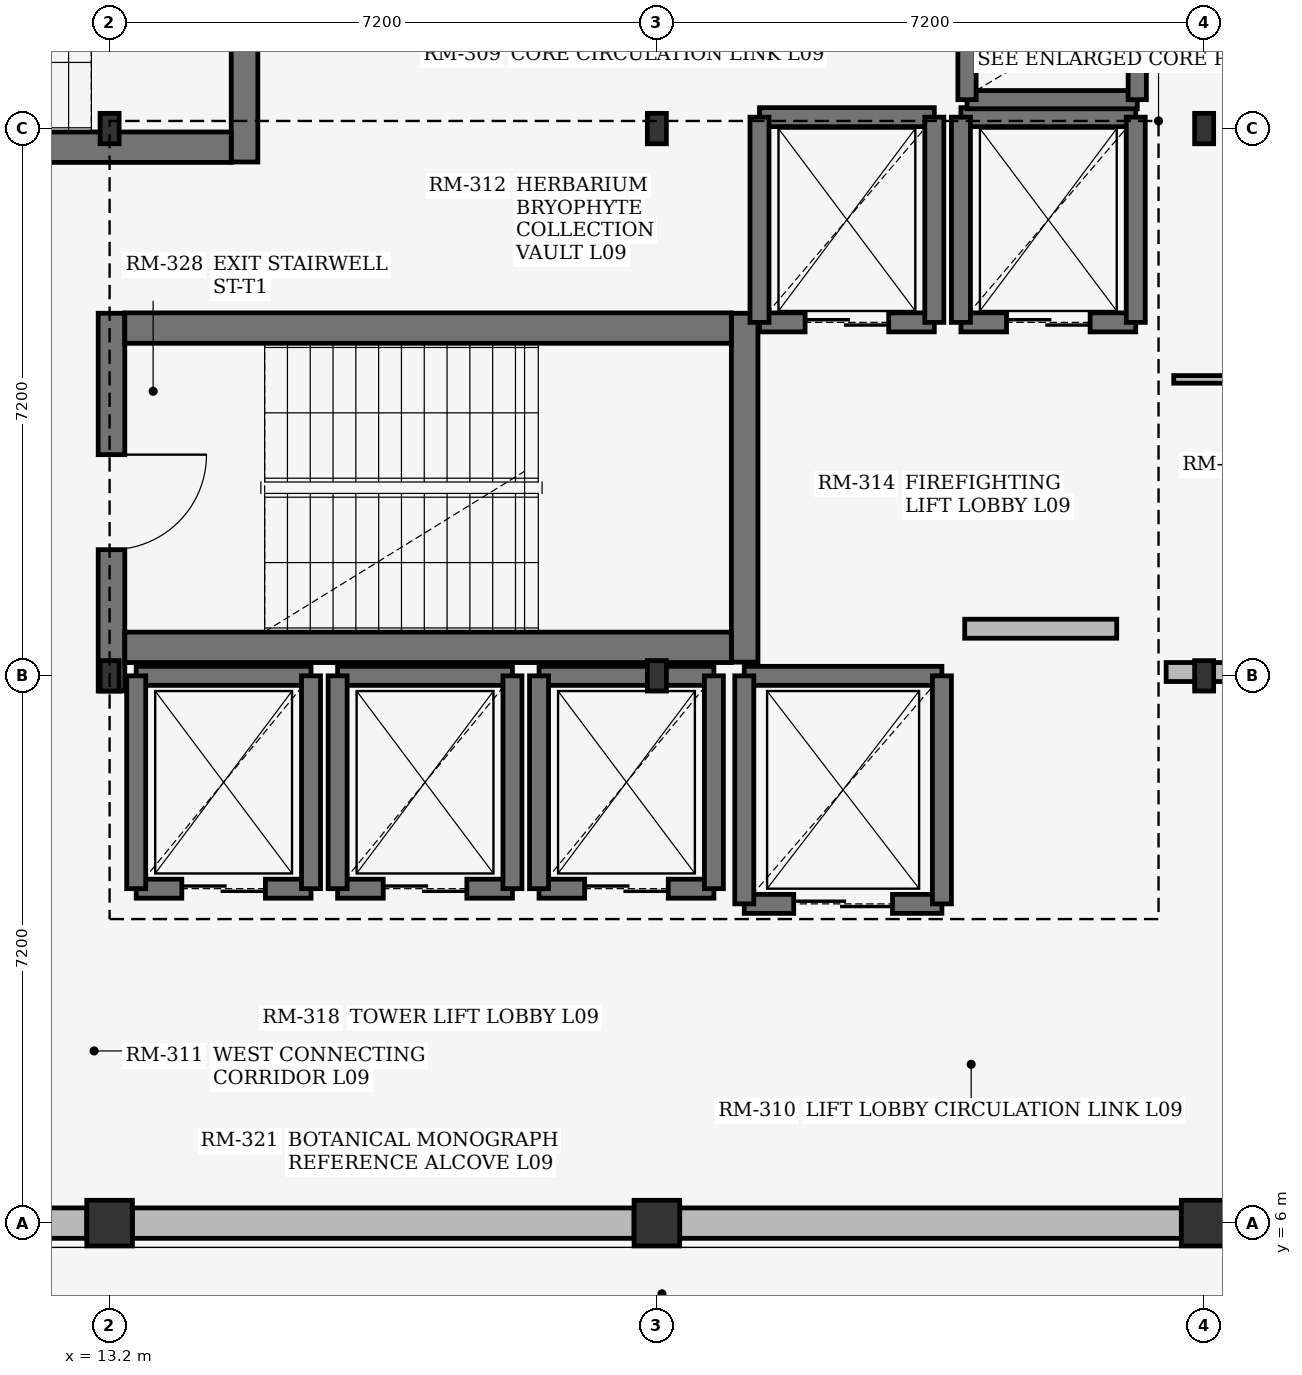
"""IFC4 building model, lengths in metres.
Left out: names, types, materials, properties, quantities, classifications, styles, units other than length and angle.
Written with IfcOpenShell. Run it as: python <this file> out.ifc"""

import sys

from ifc_helpers import new_model, si_unit, direction, frame, frame_2d, origin, origin_2d, place, context, subcontext, project, spatial, rectangle, i_section, extrude, element, fill, save


model = new_model("IFC4")
c1 = context("Model", 3, precision=1e-05, world=origin(), true_north=direction((0.0, 1.0)))
c2 = subcontext(c1, "Body", "Model", "MODEL_VIEW")
j1 = project(units=[si_unit("LENGTHUNIT", "METRE"), si_unit("PLANEANGLEUNIT", "RADIAN")], contexts=[c1])
p1 = place(None, origin())
s1 = spatial("IfcSite", under=j1, at=p1, CompositionType="ELEMENT")
p2 = place(p1, origin())
s2 = spatial("IfcBuilding", under=s1, at=p2, CompositionType="ELEMENT")
p3 = place(p2, frame((0.0, 0.0, 36.6)))
s3 = spatial("IfcBuildingStorey", under=s2, at=p3, CompositionType="ELEMENT", Elevation=36.6)
p4 = place(p3, frame((13.2, 6.0, 0.0), z_axis=(0.0, 0.0, 1.0), x_axis=(1.0, 0.0, 0.0)))
e1 = element("IfcColumn", 1, at=p4, inside=s3, PredefinedType="COLUMN", context=c2, shape_type="SweptSolid", body=[
    extrude(rectangle(XDim=0.6, YDim=0.6, at=origin_2d()), origin(), (0.0, 0.0, 1.0), 3.62),
])
for number, where, z_axis, x_axis in (
    (2, (13.2, 13.2, 0.0), (0.0, 0.0, 1.0), (1.0, 0.0, 0.0)),
    (3, (13.2, 20.4, 0.0), (0.0, 0.0, 1.0), (1.0, 0.0, 0.0)),
):
    element("IfcColumn", number, at=place(p3, frame(where, z_axis=z_axis, x_axis=x_axis)), inside=s3, PredefinedType="COLUMN", context=c2, shape_type="SweptSolid", body=[
        extrude(i_section(OverallWidth=0.25, OverallDepth=0.4, WebThickness=0.01, FlangeThickness=0.013, at=origin_2d()), origin(), (0.0, 0.0, 1.0), 3.62),
    ])
p5 = place(p3, frame((20.4, 6.0, 0.0), z_axis=(0.0, 0.0, 1.0), x_axis=(1.0, 0.0, 0.0)))
e4 = element("IfcColumn", 4, at=p5, inside=s3, PredefinedType="COLUMN", context=c2, shape_type="SweptSolid", body=[
    extrude(rectangle(XDim=0.6, YDim=0.6, at=origin_2d()), origin(), (0.0, 0.0, 1.0), 3.62),
])
for number, where, z_axis, x_axis in (
    (5, (20.4, 13.2, 0.0), (0.0, 0.0, 1.0), (1.0, 0.0, 0.0)),
    (6, (20.4, 20.4, 0.0), (0.0, 0.0, 1.0), (1.0, 0.0, 0.0)),
):
    element("IfcColumn", number, at=place(p3, frame(where, z_axis=z_axis, x_axis=x_axis)), inside=s3, PredefinedType="COLUMN", context=c2, shape_type="SweptSolid", body=[
        extrude(i_section(OverallWidth=0.25, OverallDepth=0.4, WebThickness=0.01, FlangeThickness=0.013, at=origin_2d()), origin(), (0.0, 0.0, 1.0), 3.62),
    ])
p6 = place(p3, frame((27.6, 6.0, 0.0), z_axis=(0.0, 0.0, 1.0), x_axis=(1.0, 0.0, 0.0)))
e7 = element("IfcColumn", 7, at=p6, inside=s3, PredefinedType="COLUMN", context=c2, shape_type="SweptSolid", body=[
    extrude(rectangle(XDim=0.6, YDim=0.6, at=origin_2d()), origin(), (0.0, 0.0, 1.0), 3.62),
])
for number, where, z_axis, x_axis in (
    (8, (27.6, 13.2, 0.0), (0.0, 0.0, 1.0), (1.0, 0.0, 0.0)),
    (9, (27.6, 20.4, 0.0), (0.0, 0.0, 1.0), (1.0, 0.0, 0.0)),
):
    element("IfcColumn", number, at=place(p3, frame(where, z_axis=z_axis, x_axis=x_axis)), inside=s3, PredefinedType="COLUMN", context=c2, shape_type="SweptSolid", body=[
        extrude(i_section(OverallWidth=0.25, OverallDepth=0.4, WebThickness=0.01, FlangeThickness=0.013, at=origin_2d()), origin(), (0.0, 0.0, 1.0), 3.62),
    ])
p7 = place(p3, frame((6.3, 6.0, 0.0), z_axis=(0.0, 0.0, 1.0), x_axis=(1.0, 0.0, 0.0)))
e10 = element("IfcWall", 10, at=p7, inside=s3, PredefinedType="STANDARD", context=c2, shape_type="SweptSolid", body=[
    extrude(rectangle(XDim=6.6, YDim=0.4, at=frame_2d((3.3, 0.0))), origin(), (0.0, 0.0, 1.0), 3.1),
])
for number, where, z_axis, x_axis in (
    (11, (13.5, 6.0, 0.0), (0.0, 0.0, 1.0), (1.0, 0.0, 0.0)),
    (12, (20.7, 6.0, 0.0), (0.0, 0.0, 1.0), (1.0, 0.0, 0.0)),
):
    element("IfcWall", number, at=place(p3, frame(where, z_axis=z_axis, x_axis=x_axis)), inside=s3, PredefinedType="STANDARD", context=c2, shape_type="SweptSolid", body=[
        extrude(rectangle(XDim=6.6, YDim=0.4, at=frame_2d((3.3, 0.0))), origin(), (0.0, 0.0, 1.0), 3.1),
    ])
p8 = place(p3, frame((13.225, 13.0, 0.0), z_axis=(0.0, 0.0, 1.0), x_axis=(0.0, 1.0, 0.0)))
e13 = element("IfcWall", 13, at=p8, inside=s3, PredefinedType="SHEAR", context=c2, shape_type="SweptSolid", body=[
    extrude(rectangle(XDim=4.97, YDim=0.35, at=frame_2d((2.485, 0.0))), origin(), (0.0, 0.0, 1.0), 3.62),
])
p9 = place(p8, frame((1.86, 0.0, 0.0)))
e14 = element("IfcOpeningElement", 14, at=p9, cuts=e13, PredefinedType="OPENING", context=c2, shape_type="SweptSolid", body=[
    extrude(rectangle(XDim=1.25, YDim=2.2, at=frame_2d((0.625, 1.1))), frame((0.0, 0.185, 0.0), z_axis=(0.0, -1.0, 0.0), x_axis=(1.0, 0.0, 0.0)), (0.0, 0.0, 1.0), 0.37),
])
p10 = place(p3, frame((21.555, 13.38, 0.0), z_axis=(0.0, 0.0, 1.0), x_axis=(0.0, 1.0, 0.0)))
e15 = element("IfcWall", 15, at=p10, inside=s3, PredefinedType="SHEAR", context=c2, shape_type="SweptSolid", body=[
    extrude(rectangle(XDim=4.59, YDim=0.35, at=frame_2d((2.295, 0.0))), origin(), (0.0, 0.0, 1.0), 3.62),
])
for number, where, z_axis, x_axis in (
    (16, (13.4, 13.575, 0.0), (0.0, 0.0, 1.0), (1.0, 0.0, 0.0)),
    (17, (13.4, 17.775, 0.0), (0.0, 0.0, 1.0), (1.0, 0.0, 0.0)),
):
    element("IfcWall", number, at=place(p3, frame(where, z_axis=z_axis, x_axis=x_axis)), inside=s3, PredefinedType="SHEAR", context=c2, shape_type="SweptSolid", body=[
        extrude(rectangle(XDim=7.98, YDim=0.4, at=frame_2d((3.99, 0.0))), origin(), (0.0, 0.0, 1.0), 3.62),
    ])
p11 = place(p3, frame((14.975, 24.55, 0.0), z_axis=(0.0, 0.0, 1.0), x_axis=(0.0, -1.0, 0.0)))
e18 = element("IfcWall", 18, at=p11, inside=s3, PredefinedType="SHEAR", context=c2, shape_type="SweptSolid", body=[
    extrude(rectangle(XDim=4.59, YDim=0.35, at=frame_2d((2.295, 0.0))), origin(), (0.0, 0.0, 1.0), 3.62),
])
p12 = place(p11, frame((1.72, 0.0, 0.0)))
e19 = element("IfcOpeningElement", 19, at=p12, cuts=e18, PredefinedType="OPENING", context=c2, shape_type="SweptSolid", body=[
    extrude(rectangle(XDim=1.15, YDim=2.2, at=frame_2d((0.575, 1.1))), frame((0.0, 0.185, 0.0), z_axis=(0.0, -1.0, 0.0), x_axis=(1.0, 0.0, 0.0)), (0.0, 0.0, 1.0), 0.37),
])
p13 = place(p3, frame((14.8, 20.155, 0.0), z_axis=(0.0, 0.0, 1.0), x_axis=(-1.0, 0.0, 0.0)))
e20 = element("IfcWall", 20, at=p13, inside=s3, PredefinedType="SHEAR", context=c2, shape_type="SweptSolid", body=[
    extrude(rectangle(XDim=7.98, YDim=0.4, at=frame_2d((3.99, 0.0))), origin(), (0.0, 0.0, 1.0), 3.62),
])
p14 = place(p3, frame((21.75, 17.85, 0.0), z_axis=(0.0, 0.0, 1.0), x_axis=(1.0, 0.0, 0.0)))
e21 = element("IfcWall", 21, at=p14, inside=s3, PredefinedType="SHEAR", context=c2, shape_type="SweptSolid", body=[
    extrude(rectangle(XDim=2.3, YDim=0.25, at=frame_2d((1.15, 0.0))), origin(), (0.0, 0.0, 1.0), 3.62),
])
p15 = place(p14, frame((0.6, 0.0, 0.0)))
e22 = element("IfcOpeningElement", 22, at=p15, cuts=e21, PredefinedType="OPENING", context=c2, shape_type="SweptSolid", body=[
    extrude(rectangle(XDim=1.1, YDim=2.2, at=frame_2d((0.55, 1.1))), frame((0.0, 0.135, 0.0), z_axis=(0.0, -1.0, 0.0), x_axis=(1.0, 0.0, 0.0)), (0.0, 0.0, 1.0), 0.27),
])
p16 = place(p3, frame((21.75, 20.55, 0.0), z_axis=(0.0, 0.0, 1.0), x_axis=(1.0, 0.0, 0.0)))
e23 = element("IfcWall", 23, at=p16, inside=s3, PredefinedType="SHEAR", context=c2, shape_type="SweptSolid", body=[
    extrude(rectangle(XDim=2.3, YDim=0.25, at=frame_2d((1.15, 0.0))), origin(), (0.0, 0.0, 1.0), 3.62),
])
for number, where, z_axis, x_axis in (
    (24, (21.75, 17.85, 0.0), (0.0, 0.0, 1.0), (0.0, 1.0, 0.0)),
    (25, (24.05, 17.85, 0.0), (0.0, 0.0, 1.0), (0.0, 1.0, 0.0)),
):
    element("IfcWall", number, at=place(p3, frame(where, z_axis=z_axis, x_axis=x_axis)), inside=s3, PredefinedType="SHEAR", context=c2, shape_type="SweptSolid", body=[
        extrude(rectangle(XDim=2.7, YDim=0.25, at=frame_2d((1.35, 0.0))), origin(), (0.0, 0.0, 1.0), 3.62),
    ])
p17 = place(p3, frame((24.4, 17.85, 0.0), z_axis=(0.0, 0.0, 1.0), x_axis=(1.0, 0.0, 0.0)))
e26 = element("IfcWall", 26, at=p17, inside=s3, PredefinedType="SHEAR", context=c2, shape_type="SweptSolid", body=[
    extrude(rectangle(XDim=2.3, YDim=0.25, at=frame_2d((1.15, 0.0))), origin(), (0.0, 0.0, 1.0), 3.62),
])
p18 = place(p17, frame((0.6, 0.0, 0.0)))
e27 = element("IfcOpeningElement", 27, at=p18, cuts=e26, PredefinedType="OPENING", context=c2, shape_type="SweptSolid", body=[
    extrude(rectangle(XDim=1.1, YDim=2.2, at=frame_2d((0.55, 1.1))), frame((0.0, 0.135, 0.0), z_axis=(0.0, -1.0, 0.0), x_axis=(1.0, 0.0, 0.0)), (0.0, 0.0, 1.0), 0.27),
])
p19 = place(p3, frame((24.4, 20.55, 0.0), z_axis=(0.0, 0.0, 1.0), x_axis=(1.0, 0.0, 0.0)))
e28 = element("IfcWall", 28, at=p19, inside=s3, PredefinedType="SHEAR", context=c2, shape_type="SweptSolid", body=[
    extrude(rectangle(XDim=2.3, YDim=0.25, at=frame_2d((1.15, 0.0))), origin(), (0.0, 0.0, 1.0), 3.62),
])
for number, where, z_axis, x_axis in (
    (29, (24.4, 17.85, 0.0), (0.0, 0.0, 1.0), (0.0, 1.0, 0.0)),
    (30, (26.7, 17.85, 0.0), (0.0, 0.0, 1.0), (0.0, 1.0, 0.0)),
):
    element("IfcWall", number, at=place(p3, frame(where, z_axis=z_axis, x_axis=x_axis)), inside=s3, PredefinedType="SHEAR", context=c2, shape_type="SweptSolid", body=[
        extrude(rectangle(XDim=2.7, YDim=0.25, at=frame_2d((1.35, 0.0))), origin(), (0.0, 0.0, 1.0), 3.62),
    ])
p20 = place(p3, frame((13.55, 10.4, 0.0), z_axis=(0.0, 0.0, 1.0), x_axis=(1.0, 0.0, 0.0)))
e31 = element("IfcWall", 31, at=p20, inside=s3, PredefinedType="SHEAR", context=c2, shape_type="SweptSolid", body=[
    extrude(rectangle(XDim=2.3, YDim=0.25, at=frame_2d((1.15, 0.0))), origin(), (0.0, 0.0, 1.0), 3.62),
])
p21 = place(p20, frame((0.6, 0.0, 0.0)))
e32 = element("IfcOpeningElement", 32, at=p21, cuts=e31, PredefinedType="OPENING", context=c2, shape_type="SweptSolid", body=[
    extrude(rectangle(XDim=1.1, YDim=2.2, at=frame_2d((0.55, 1.1))), frame((0.0, 0.135, 0.0), z_axis=(0.0, -1.0, 0.0), x_axis=(1.0, 0.0, 0.0)), (0.0, 0.0, 1.0), 0.27),
])
p22 = place(p3, frame((13.55, 13.2, 0.0), z_axis=(0.0, 0.0, 1.0), x_axis=(1.0, 0.0, 0.0)))
e33 = element("IfcWall", 33, at=p22, inside=s3, PredefinedType="SHEAR", context=c2, shape_type="SweptSolid", body=[
    extrude(rectangle(XDim=2.3, YDim=0.25, at=frame_2d((1.15, 0.0))), origin(), (0.0, 0.0, 1.0), 3.62),
])
for number, where, z_axis, x_axis in (
    (34, (13.55, 10.4, 0.0), (0.0, 0.0, 1.0), (0.0, 1.0, 0.0)),
    (35, (15.85, 10.4, 0.0), (0.0, 0.0, 1.0), (0.0, 1.0, 0.0)),
):
    element("IfcWall", number, at=place(p3, frame(where, z_axis=z_axis, x_axis=x_axis)), inside=s3, PredefinedType="SHEAR", context=c2, shape_type="SweptSolid", body=[
        extrude(rectangle(XDim=2.8, YDim=0.25, at=frame_2d((1.4, 0.0))), origin(), (0.0, 0.0, 1.0), 3.62),
    ])
p23 = place(p3, frame((16.2, 10.4, 0.0), z_axis=(0.0, 0.0, 1.0), x_axis=(1.0, 0.0, 0.0)))
e36 = element("IfcWall", 36, at=p23, inside=s3, PredefinedType="SHEAR", context=c2, shape_type="SweptSolid", body=[
    extrude(rectangle(XDim=2.3, YDim=0.25, at=frame_2d((1.15, 0.0))), origin(), (0.0, 0.0, 1.0), 3.62),
])
p24 = place(p23, frame((0.6, 0.0, 0.0)))
e37 = element("IfcOpeningElement", 37, at=p24, cuts=e36, PredefinedType="OPENING", context=c2, shape_type="SweptSolid", body=[
    extrude(rectangle(XDim=1.1, YDim=2.2, at=frame_2d((0.55, 1.1))), frame((0.0, 0.135, 0.0), z_axis=(0.0, -1.0, 0.0), x_axis=(1.0, 0.0, 0.0)), (0.0, 0.0, 1.0), 0.27),
])
p25 = place(p3, frame((16.2, 13.2, 0.0), z_axis=(0.0, 0.0, 1.0), x_axis=(1.0, 0.0, 0.0)))
e38 = element("IfcWall", 38, at=p25, inside=s3, PredefinedType="SHEAR", context=c2, shape_type="SweptSolid", body=[
    extrude(rectangle(XDim=2.3, YDim=0.25, at=frame_2d((1.15, 0.0))), origin(), (0.0, 0.0, 1.0), 3.62),
])
for number, where, z_axis, x_axis in (
    (39, (16.2, 10.4, 0.0), (0.0, 0.0, 1.0), (0.0, 1.0, 0.0)),
    (40, (18.5, 10.4, 0.0), (0.0, 0.0, 1.0), (0.0, 1.0, 0.0)),
):
    element("IfcWall", number, at=place(p3, frame(where, z_axis=z_axis, x_axis=x_axis)), inside=s3, PredefinedType="SHEAR", context=c2, shape_type="SweptSolid", body=[
        extrude(rectangle(XDim=2.8, YDim=0.25, at=frame_2d((1.4, 0.0))), origin(), (0.0, 0.0, 1.0), 3.62),
    ])
p26 = place(p3, frame((18.85, 10.4, 0.0), z_axis=(0.0, 0.0, 1.0), x_axis=(1.0, 0.0, 0.0)))
e41 = element("IfcWall", 41, at=p26, inside=s3, PredefinedType="SHEAR", context=c2, shape_type="SweptSolid", body=[
    extrude(rectangle(XDim=2.3, YDim=0.25, at=frame_2d((1.15, 0.0))), origin(), (0.0, 0.0, 1.0), 3.62),
])
p27 = place(p26, frame((0.6, 0.0, 0.0)))
e42 = element("IfcOpeningElement", 42, at=p27, cuts=e41, PredefinedType="OPENING", context=c2, shape_type="SweptSolid", body=[
    extrude(rectangle(XDim=1.1, YDim=2.2, at=frame_2d((0.55, 1.1))), frame((0.0, 0.135, 0.0), z_axis=(0.0, -1.0, 0.0), x_axis=(1.0, 0.0, 0.0)), (0.0, 0.0, 1.0), 0.27),
])
p28 = place(p3, frame((18.85, 13.2, 0.0), z_axis=(0.0, 0.0, 1.0), x_axis=(1.0, 0.0, 0.0)))
e43 = element("IfcWall", 43, at=p28, inside=s3, PredefinedType="SHEAR", context=c2, shape_type="SweptSolid", body=[
    extrude(rectangle(XDim=2.3, YDim=0.25, at=frame_2d((1.15, 0.0))), origin(), (0.0, 0.0, 1.0), 3.62),
])
for number, where, z_axis, x_axis in (
    (44, (18.85, 10.4, 0.0), (0.0, 0.0, 1.0), (0.0, 1.0, 0.0)),
    (45, (21.15, 10.4, 0.0), (0.0, 0.0, 1.0), (0.0, 1.0, 0.0)),
):
    element("IfcWall", number, at=place(p3, frame(where, z_axis=z_axis, x_axis=x_axis)), inside=s3, PredefinedType="SHEAR", context=c2, shape_type="SweptSolid", body=[
        extrude(rectangle(XDim=2.8, YDim=0.25, at=frame_2d((1.4, 0.0))), origin(), (0.0, 0.0, 1.0), 3.62),
    ])
p29 = place(p3, frame((21.55, 10.2, 0.0), z_axis=(0.0, 0.0, 1.0), x_axis=(1.0, 0.0, 0.0)))
e46 = element("IfcWall", 46, at=p29, inside=s3, PredefinedType="SHEAR", context=c2, shape_type="SweptSolid", body=[
    extrude(rectangle(XDim=2.6, YDim=0.25, at=frame_2d((1.3, 0.0))), origin(), (0.0, 0.0, 1.0), 3.62),
])
p30 = place(p29, frame((0.65, 0.0, 0.0)))
e47 = element("IfcOpeningElement", 47, at=p30, cuts=e46, PredefinedType="OPENING", context=c2, shape_type="SweptSolid", body=[
    extrude(rectangle(XDim=1.3, YDim=2.25, at=frame_2d((0.65, 1.125))), frame((0.0, 0.135, 0.0), z_axis=(0.0, -1.0, 0.0), x_axis=(1.0, 0.0, 0.0)), (0.0, 0.0, 1.0), 0.27),
])
p31 = place(p3, frame((21.55, 13.2, 0.0), z_axis=(0.0, 0.0, 1.0), x_axis=(1.0, 0.0, 0.0)))
e48 = element("IfcWall", 48, at=p31, inside=s3, PredefinedType="SHEAR", context=c2, shape_type="SweptSolid", body=[
    extrude(rectangle(XDim=2.6, YDim=0.25, at=frame_2d((1.3, 0.0))), origin(), (0.0, 0.0, 1.0), 3.62),
])
for number, where, z_axis, x_axis in (
    (49, (21.55, 10.2, 0.0), (0.0, 0.0, 1.0), (0.0, 1.0, 0.0)),
    (50, (24.15, 10.2, 0.0), (0.0, 0.0, 1.0), (0.0, 1.0, 0.0)),
):
    element("IfcWall", number, at=place(p3, frame(where, z_axis=z_axis, x_axis=x_axis)), inside=s3, PredefinedType="SHEAR", context=c2, shape_type="SweptSolid", body=[
        extrude(rectangle(XDim=3.0, YDim=0.25, at=frame_2d((1.5, 0.0))), origin(), (0.0, 0.0, 1.0), 3.62),
    ])
p32 = place(p3, frame((24.48, 20.78, 0.0), z_axis=(0.0, 0.0, 1.0), x_axis=(1.0, 0.0, 0.0)))
e51 = element("IfcWall", 51, at=p32, inside=s3, PredefinedType="SHEAR", context=c2, shape_type="SweptSolid", body=[
    extrude(rectangle(XDim=2.24, YDim=0.24, at=frame_2d((1.12, 0.0))), origin(), (0.0, 0.0, 1.0), 3.62),
])
for number, where, z_axis, x_axis in (
    (52, (24.48, 20.78, 0.0), (0.0, 0.0, 1.0), (0.0, 1.0, 0.0)),
    (53, (26.72, 20.78, 0.0), (0.0, 0.0, 1.0), (0.0, 1.0, 0.0)),
):
    element("IfcWall", number, at=place(p3, frame(where, z_axis=z_axis, x_axis=x_axis)), inside=s3, PredefinedType="SHEAR", context=c2, shape_type="SweptSolid", body=[
        extrude(rectangle(XDim=2.94, YDim=0.24, at=frame_2d((1.47, 0.0))), origin(), (0.0, 0.0, 1.0), 3.62),
    ])
p33 = place(p3, frame((24.45, 13.82, 0.0), z_axis=(0.0, 0.0, 1.0), x_axis=(1.0, 0.0, 0.0)))
e54 = element("IfcWall", 54, at=p33, inside=s3, PredefinedType="SOLIDWALL", context=c2, shape_type="SweptSolid", body=[
    extrude(rectangle(XDim=2.0, YDim=0.25, at=frame_2d((1.0, 0.0))), origin(), (0.0, 0.0, 1.0), 3.6),
])
p34 = place(p3, frame((27.2, 17.1, 0.0), z_axis=(0.0, 0.0, 1.0), x_axis=(1.0, 0.0, 0.0)))
e55 = element("IfcWall", 55, at=p34, inside=s3, PredefinedType="PARTITIONING", context=c2, shape_type="SweptSolid", body=[
    extrude(rectangle(XDim=7.05, YDim=0.1, at=frame_2d((3.525, 0.0))), origin(), (0.0, 0.0, 1.0), 3.6),
])
p35 = place(p34, frame((2.885, 0.0, 0.0)))
e56 = element("IfcOpeningElement", 56, at=p35, cuts=e55, PredefinedType="OPENING", context=c2, shape_type="SweptSolid", body=[
    extrude(rectangle(XDim=1.28, YDim=2.15, at=frame_2d((0.64, 1.075))), frame((0.0, 0.06, 0.0), z_axis=(0.0, -1.0, 0.0), x_axis=(1.0, 0.0, 0.0)), (0.0, 0.0, 1.0), 0.12),
])
p36 = place(p3, frame((27.1, 13.25, 0.0), z_axis=(0.0, 0.0, 1.0), x_axis=(1.0, 0.0, 0.0)))
e57 = element("IfcWall", 57, at=p36, inside=s3, PredefinedType="SOLIDWALL", context=c2, shape_type="SweptSolid", body=[
    extrude(rectangle(XDim=7.4, YDim=0.25, at=frame_2d((3.7, 0.0))), origin(), (0.0, 0.0, 1.0), 3.11),
])
p37 = place(p36, frame((2.8, 0.0, 0.0)))
e58 = element("IfcOpeningElement", 58, at=p37, cuts=e57, PredefinedType="OPENING", context=c2, shape_type="SweptSolid", body=[
    extrude(rectangle(XDim=1.8, YDim=2.25, at=frame_2d((0.9, 1.125))), frame((0.0, 0.135, 0.0), z_axis=(0.0, -1.0, 0.0), x_axis=(1.0, 0.0, 0.0)), (0.0, 0.0, 1.0), 0.27),
])
p38 = place(p9, origin())
e59 = element("IfcDoor", 59, at=p38, inside=s3, OperationType="SINGLE_SWING_RIGHT", PredefinedType="DOOR", context=c2, shape_type="SweptSolid", body=[
    extrude(rectangle(XDim=1.25, YDim=2.2, at=frame_2d((0.625, 1.1))), frame((0.0, 0.025, 0.0), z_axis=(0.0, -1.0, 0.0), x_axis=(1.0, 0.0, 0.0)), (0.0, 0.0, 1.0), 0.05),
])
fill(e14, e59)
p39 = place(p15, origin())
e60 = element("IfcDoor", 60, at=p39, inside=s3, OperationType="DOUBLE_DOOR_SLIDING", PredefinedType="DOOR", context=c2, shape_type="SweptSolid", body=[
    extrude(rectangle(XDim=1.1, YDim=2.2, at=frame_2d((0.55, 1.1))), frame((0.0, 0.025, 0.0), z_axis=(0.0, -1.0, 0.0), x_axis=(1.0, 0.0, 0.0)), (0.0, 0.0, 1.0), 0.05),
])
fill(e22, e60)
p40 = place(p18, origin())
e61 = element("IfcDoor", 61, at=p40, inside=s3, OperationType="DOUBLE_DOOR_SLIDING", PredefinedType="DOOR", context=c2, shape_type="SweptSolid", body=[
    extrude(rectangle(XDim=1.1, YDim=2.2, at=frame_2d((0.55, 1.1))), frame((0.0, 0.025, 0.0), z_axis=(0.0, -1.0, 0.0), x_axis=(1.0, 0.0, 0.0)), (0.0, 0.0, 1.0), 0.05),
])
fill(e27, e61)
p41 = place(p21, origin())
e62 = element("IfcDoor", 62, at=p41, inside=s3, OperationType="DOUBLE_DOOR_SLIDING", PredefinedType="DOOR", context=c2, shape_type="SweptSolid", body=[
    extrude(rectangle(XDim=1.1, YDim=2.2, at=frame_2d((0.55, 1.1))), frame((0.0, 0.025, 0.0), z_axis=(0.0, -1.0, 0.0), x_axis=(1.0, 0.0, 0.0)), (0.0, 0.0, 1.0), 0.05),
])
fill(e32, e62)
p42 = place(p24, origin())
e63 = element("IfcDoor", 63, at=p42, inside=s3, OperationType="DOUBLE_DOOR_SLIDING", PredefinedType="DOOR", context=c2, shape_type="SweptSolid", body=[
    extrude(rectangle(XDim=1.1, YDim=2.2, at=frame_2d((0.55, 1.1))), frame((0.0, 0.025, 0.0), z_axis=(0.0, -1.0, 0.0), x_axis=(1.0, 0.0, 0.0)), (0.0, 0.0, 1.0), 0.05),
])
fill(e37, e63)
p43 = place(p27, origin())
e64 = element("IfcDoor", 64, at=p43, inside=s3, OperationType="DOUBLE_DOOR_SLIDING", PredefinedType="DOOR", context=c2, shape_type="SweptSolid", body=[
    extrude(rectangle(XDim=1.1, YDim=2.2, at=frame_2d((0.55, 1.1))), frame((0.0, 0.025, 0.0), z_axis=(0.0, -1.0, 0.0), x_axis=(1.0, 0.0, 0.0)), (0.0, 0.0, 1.0), 0.05),
])
fill(e42, e64)
p44 = place(p30, origin())
e65 = element("IfcDoor", 65, at=p44, inside=s3, OperationType="DOUBLE_DOOR_SLIDING", PredefinedType="DOOR", context=c2, shape_type="SweptSolid", body=[
    extrude(rectangle(XDim=1.3, YDim=2.25, at=frame_2d((0.65, 1.125))), frame((0.0, 0.025, 0.0), z_axis=(0.0, -1.0, 0.0), x_axis=(1.0, 0.0, 0.0)), (0.0, 0.0, 1.0), 0.05),
])
fill(e47, e65)
save(model, sys.argv[1])
